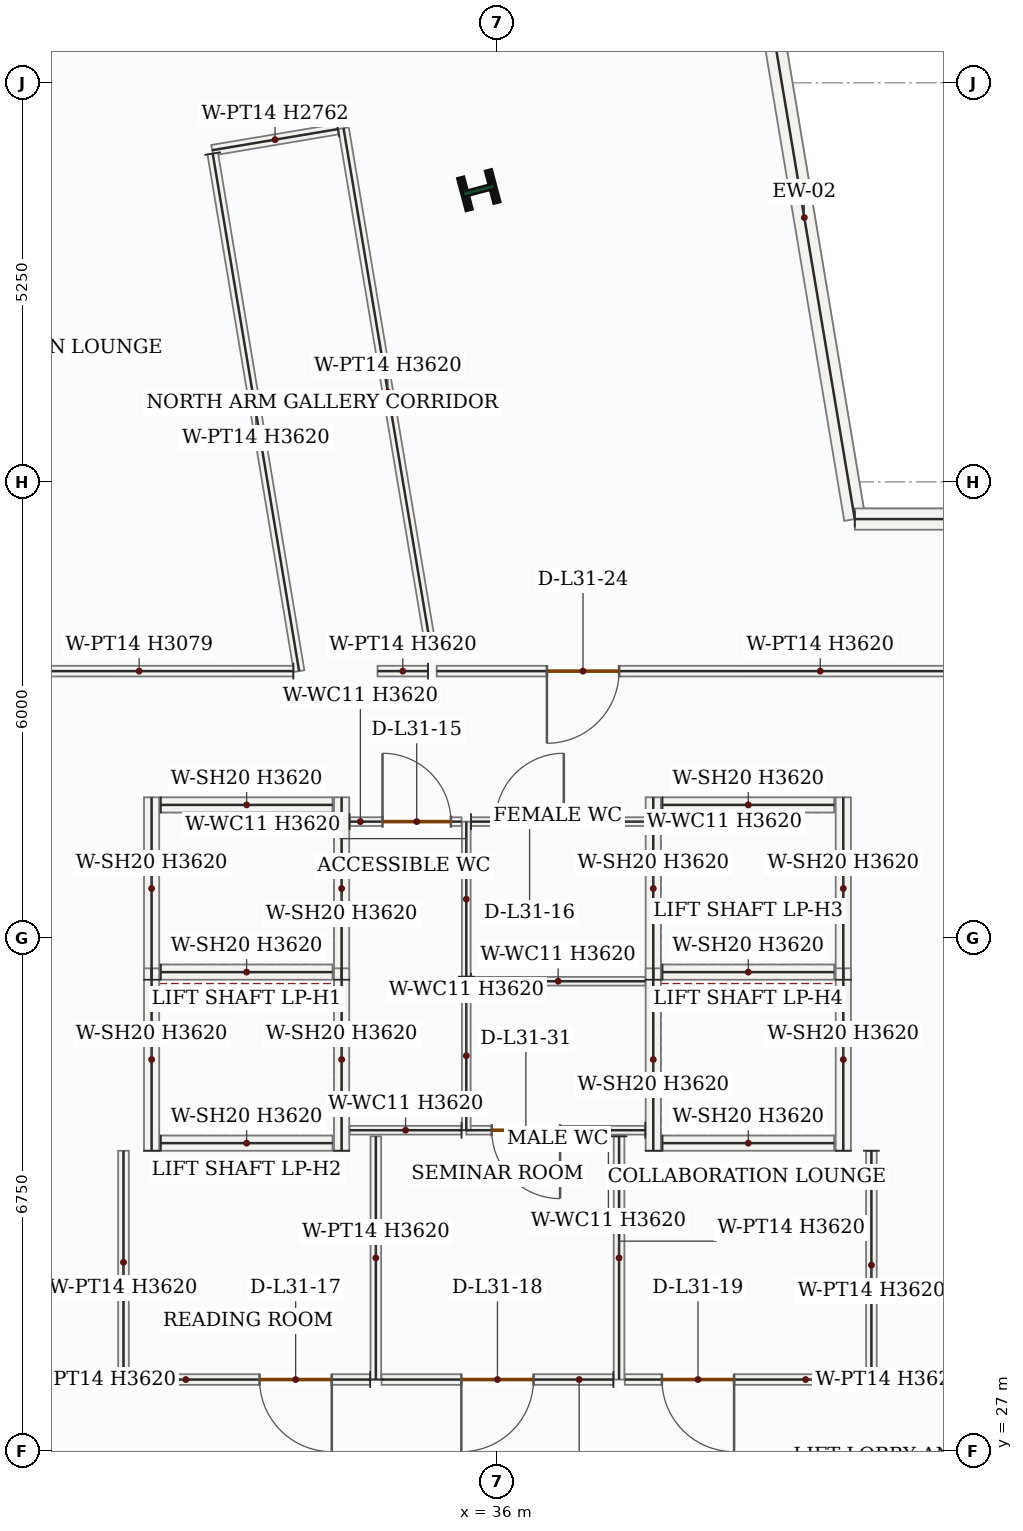
"""IFC4 building model, lengths in metres.
Left out: names, types, materials, properties, quantities, classifications, styles, units other than length and angle.
Written with IfcOpenShell. Run it as: python <this file> out.ifc"""

import sys

from ifc_helpers import new_model, si_unit, direction, frame, frame_2d, origin, origin_2d, place, context, subcontext, project, spatial, rectangle, i_section, extrude, source, transform, mapped, element, fill, save


model = new_model("IFC4")
c1 = context("Model", 3, precision=1e-05, world=origin(), true_north=direction((0.0, 1.0)))
c2 = subcontext(c1, "Body", "Model", "MODEL_VIEW")
j1 = project(units=[si_unit("LENGTHUNIT", "METRE"), si_unit("PLANEANGLEUNIT", "RADIAN")], contexts=[c1])
p1 = place(None, origin())
s1 = spatial("IfcSite", under=j1, at=p1, CompositionType="ELEMENT")
p2 = place(p1, origin())
s2 = spatial("IfcBuilding", under=s1, at=p2, CompositionType="ELEMENT")
p3 = place(p2, frame((0.0, 0.0, 139.5)))
s3 = spatial("IfcBuildingStorey", under=s2, at=p3, CompositionType="ELEMENT", Elevation=139.5)
m1 = source(origin(), c2, "Body", "SweptSolid", [
    extrude(i_section(OverallWidth=0.412, OverallDepth=0.435, WebThickness=0.036, FlangeThickness=0.057, FilletRadius=0.018, at=origin_2d()), origin(), (0.0, 0.0, 1.0), 3.9),
])
p4 = place(p3, frame((35.755, 43.588, 0.0), z_axis=(0.0, 0.0, 1.0), x_axis=(-0.255445757936, 0.966823388604, 0.0)))
e1 = element("IfcColumn", 1, at=p4, inside=s3, PredefinedType="COLUMN", context=c2, shape_type="MappedRepresentation", body=[
    mapped(m1, transform((0.0, 0.0, 0.0), x_axis=(1.0, 0.0, 0.0), y_axis=(0.0, 1.0, 0.0), z_axis=(0.0, 0.0, 1.0), scale=1.0)),
])
m2 = source(origin(), c2, "Body", "SweptSolid", [
    extrude(rectangle(XDim=8.044, YDim=0.28, at=frame_2d((4.022, 0.0))), origin(), (0.0, 0.0, 1.0), 3.62),
])
p5 = place(p3, frame((39.373, 47.194, 0.0), z_axis=(0.0, 0.0, 1.0), x_axis=(0.165048626668, -0.986285430712, 0.0)))
e2 = element("IfcWall", 2, at=p5, inside=s3, PredefinedType="SOLIDWALL", context=c2, shape_type="MappedRepresentation", body=[
    mapped(m2, transform((0.0, 0.0, 0.0), x_axis=(1.0, 0.0, 0.0), y_axis=(0.0, 1.0, 0.0), z_axis=(0.0, 0.0, 1.0), scale=1.0)),
])
m3 = source(origin(), c2, "Body", "SweptSolid", [
    extrude(rectangle(XDim=8.641, YDim=0.28, at=frame_2d((4.321, 0.0))), origin(), (0.0, 0.0, 1.0), 3.62),
])
p6 = place(p3, frame((40.701, 39.26, 0.0), z_axis=(0.0, 0.0, 1.0), x_axis=(1.0, 0.0, 0.0)))
e3 = element("IfcWall", 3, at=p6, inside=s3, PredefinedType="SOLIDWALL", context=c2, shape_type="MappedRepresentation", body=[
    mapped(m3, transform((0.0, 0.0, 0.0), x_axis=(1.0, 0.0, 0.0), y_axis=(0.0, 1.0, 0.0), z_axis=(0.0, 0.0, 1.0), scale=1.0)),
])
m4 = source(origin(), c2, "Body", "SweptSolid", [
    extrude(rectangle(XDim=2.4, YDim=0.2, at=frame_2d((1.2, 0.0))), origin(), (0.0, 0.0, 1.0), 3.62),
])
for number, where, z_axis, x_axis in (
    (4, (31.45, 33.2, 0.0), (0.0, 0.0, 1.0), (0.0, 1.0, 0.0)),
    (5, (33.95, 33.2, 0.0), (0.0, 0.0, 1.0), (0.0, 1.0, 0.0)),
):
    element("IfcWall", number, at=place(p3, frame(where, z_axis=z_axis, x_axis=x_axis)), inside=s3, PredefinedType="SOLIDWALL", context=c2, shape_type="MappedRepresentation", body=[
        mapped(m4, transform((0.0, 0.0, 0.0), x_axis=(1.0, 0.0, 0.0), y_axis=(0.0, 1.0, 0.0), z_axis=(0.0, 0.0, 1.0), scale=1.0)),
    ])
m5 = source(origin(), c2, "Body", "SweptSolid", [
    extrude(rectangle(XDim=2.26, YDim=0.2, at=frame_2d((1.13, 0.0))), origin(), (0.0, 0.0, 1.0), 3.62),
])
for number, where, z_axis, x_axis in (
    (6, (31.57, 33.3, 0.0), (0.0, 0.0, 1.0), (1.0, 0.0, 0.0)),
    (7, (31.57, 35.5, 0.0), (0.0, 0.0, 1.0), (1.0, 0.0, 0.0)),
):
    element("IfcWall", number, at=place(p3, frame(where, z_axis=z_axis, x_axis=x_axis)), inside=s3, PredefinedType="SOLIDWALL", context=c2, shape_type="MappedRepresentation", body=[
        mapped(m5, transform((0.0, 0.0, 0.0), x_axis=(1.0, 0.0, 0.0), y_axis=(0.0, 1.0, 0.0), z_axis=(0.0, 0.0, 1.0), scale=1.0)),
    ])
for number, where, z_axis, x_axis in (
    (8, (31.45, 30.95, 0.0), (0.0, 0.0, 1.0), (0.0, 1.0, 0.0)),
    (9, (33.95, 30.95, 0.0), (0.0, 0.0, 1.0), (0.0, 1.0, 0.0)),
):
    element("IfcWall", number, at=place(p3, frame(where, z_axis=z_axis, x_axis=x_axis)), inside=s3, PredefinedType="SOLIDWALL", context=c2, shape_type="MappedRepresentation", body=[
        mapped(m4, transform((0.0, 0.0, 0.0), x_axis=(1.0, 0.0, 0.0), y_axis=(0.0, 1.0, 0.0), z_axis=(0.0, 0.0, 1.0), scale=1.0)),
    ])
p7 = place(p3, frame((31.57, 31.05, 0.0), z_axis=(0.0, 0.0, 1.0), x_axis=(1.0, 0.0, 0.0)))
e10 = element("IfcWall", 10, at=p7, inside=s3, PredefinedType="SOLIDWALL", context=c2, shape_type="MappedRepresentation", body=[
    mapped(m5, transform((0.0, 0.0, 0.0), x_axis=(1.0, 0.0, 0.0), y_axis=(0.0, 1.0, 0.0), z_axis=(0.0, 0.0, 1.0), scale=1.0)),
])
for number, where, z_axis, x_axis in (
    (11, (38.05, 33.2, 0.0), (0.0, 0.0, 1.0), (0.0, 1.0, 0.0)),
    (12, (40.55, 33.2, 0.0), (0.0, 0.0, 1.0), (0.0, 1.0, 0.0)),
):
    element("IfcWall", number, at=place(p3, frame(where, z_axis=z_axis, x_axis=x_axis)), inside=s3, PredefinedType="SOLIDWALL", context=c2, shape_type="MappedRepresentation", body=[
        mapped(m4, transform((0.0, 0.0, 0.0), x_axis=(1.0, 0.0, 0.0), y_axis=(0.0, 1.0, 0.0), z_axis=(0.0, 0.0, 1.0), scale=1.0)),
    ])
for number, where, z_axis, x_axis in (
    (13, (38.17, 33.3, 0.0), (0.0, 0.0, 1.0), (1.0, 0.0, 0.0)),
    (14, (38.17, 35.5, 0.0), (0.0, 0.0, 1.0), (1.0, 0.0, 0.0)),
):
    element("IfcWall", number, at=place(p3, frame(where, z_axis=z_axis, x_axis=x_axis)), inside=s3, PredefinedType="SOLIDWALL", context=c2, shape_type="MappedRepresentation", body=[
        mapped(m5, transform((0.0, 0.0, 0.0), x_axis=(1.0, 0.0, 0.0), y_axis=(0.0, 1.0, 0.0), z_axis=(0.0, 0.0, 1.0), scale=1.0)),
    ])
for number, where, z_axis, x_axis in (
    (15, (38.05, 30.95, 0.0), (0.0, 0.0, 1.0), (0.0, 1.0, 0.0)),
    (16, (40.55, 30.95, 0.0), (0.0, 0.0, 1.0), (0.0, 1.0, 0.0)),
):
    element("IfcWall", number, at=place(p3, frame(where, z_axis=z_axis, x_axis=x_axis)), inside=s3, PredefinedType="SOLIDWALL", context=c2, shape_type="MappedRepresentation", body=[
        mapped(m4, transform((0.0, 0.0, 0.0), x_axis=(1.0, 0.0, 0.0), y_axis=(0.0, 1.0, 0.0), z_axis=(0.0, 0.0, 1.0), scale=1.0)),
    ])
p8 = place(p3, frame((38.17, 31.05, 0.0), z_axis=(0.0, 0.0, 1.0), x_axis=(1.0, 0.0, 0.0)))
e17 = element("IfcWall", 17, at=p8, inside=s3, PredefinedType="SOLIDWALL", context=c2, shape_type="MappedRepresentation", body=[
    mapped(m5, transform((0.0, 0.0, 0.0), x_axis=(1.0, 0.0, 0.0), y_axis=(0.0, 1.0, 0.0), z_axis=(0.0, 0.0, 1.0), scale=1.0)),
])
p9 = place(p3, frame((37.945, 31.22, 0.0), z_axis=(0.0, 0.0, 1.0), x_axis=(-1.0, 0.0, 0.0)))
e18 = element("IfcWall", 18, at=p9, inside=s3, PredefinedType="PARTITIONING", context=c2, shape_type="SweptSolid", body=[
    extrude(rectangle(XDim=2.355, YDim=0.115, at=frame_2d((1.177, 0.0))), origin(), (0.0, 0.0, 1.0), 3.62),
])
p10 = place(p9, frame((1.121, 0.0, 0.0)))
e19 = element("IfcOpeningElement", 19, at=p10, cuts=e18, PredefinedType="OPENING", context=c2, shape_type="SweptSolid", body=[
    extrude(rectangle(XDim=0.9, YDim=2.1, at=frame_2d((0.45, 1.05))), frame((0.0, 0.067, 0.0), z_axis=(0.0, -1.0, 0.0), x_axis=(1.0, 0.0, 0.0)), (0.0, 0.0, 1.0), 0.135),
])
m6 = source(origin(), c2, "Body", "SweptSolid", [
    extrude(rectangle(XDim=1.96, YDim=0.115, at=frame_2d((0.98, 0.0))), origin(), (0.0, 0.0, 1.0), 3.62),
])
p11 = place(p3, frame((35.59, 31.22, 0.0), z_axis=(0.0, 0.0, 1.0), x_axis=(0.0, 1.0, 0.0)))
e20 = element("IfcWall", 20, at=p11, inside=s3, PredefinedType="PARTITIONING", context=c2, shape_type="MappedRepresentation", body=[
    mapped(m6, transform((0.0, 0.0, 0.0), x_axis=(1.0, 0.0, 0.0), y_axis=(0.0, 1.0, 0.0), z_axis=(0.0, 0.0, 1.0), scale=1.0)),
])
m7 = source(origin(), c2, "Body", "SweptSolid", [
    extrude(rectangle(XDim=2.292, YDim=0.115, at=frame_2d((1.146, 0.0))), origin(), (0.0, 0.0, 1.0), 3.62),
])
p12 = place(p3, frame((35.653, 33.18, 0.0), z_axis=(0.0, 0.0, 1.0), x_axis=(1.0, 0.0, 0.0)))
e21 = element("IfcWall", 21, at=p12, inside=s3, PredefinedType="PARTITIONING", context=c2, shape_type="MappedRepresentation", body=[
    mapped(m7, transform((0.0, 0.0, 0.0), x_axis=(1.0, 0.0, 0.0), y_axis=(0.0, 1.0, 0.0), z_axis=(0.0, 0.0, 1.0), scale=1.0)),
])
m8 = source(origin(), c2, "Body", "SweptSolid", [
    extrude(rectangle(XDim=2.04, YDim=0.115, at=frame_2d((1.02, 0.0))), origin(), (0.0, 0.0, 1.0), 3.62),
])
p13 = place(p3, frame((35.59, 33.24, 0.0), z_axis=(0.0, 0.0, 1.0), x_axis=(0.0, 1.0, 0.0)))
e22 = element("IfcWall", 22, at=p13, inside=s3, PredefinedType="PARTITIONING", context=c2, shape_type="MappedRepresentation", body=[
    mapped(m8, transform((0.0, 0.0, 0.0), x_axis=(1.0, 0.0, 0.0), y_axis=(0.0, 1.0, 0.0), z_axis=(0.0, 0.0, 1.0), scale=1.0)),
])
p14 = place(p3, frame((35.653, 35.28, 0.0), z_axis=(0.0, 0.0, 1.0), x_axis=(1.0, 0.0, 0.0)))
e23 = element("IfcWall", 23, at=p14, inside=s3, PredefinedType="PARTITIONING", context=c2, shape_type="SweptSolid", body=[
    extrude(rectangle(XDim=2.292, YDim=0.115, at=frame_2d((1.146, 0.0))), origin(), (0.0, 0.0, 1.0), 3.62),
])
p15 = place(p14, frame((0.32, 0.0, 0.0)))
e24 = element("IfcOpeningElement", 24, at=p15, cuts=e23, PredefinedType="OPENING", context=c2, shape_type="SweptSolid", body=[
    extrude(rectangle(XDim=0.9, YDim=2.1, at=frame_2d((0.45, 1.05))), frame((0.0, 0.067, 0.0), z_axis=(0.0, -1.0, 0.0), x_axis=(1.0, 0.0, 0.0)), (0.0, 0.0, 1.0), 0.135),
])
m9 = source(origin(), c2, "Body", "SweptSolid", [
    extrude(rectangle(XDim=1.473, YDim=0.115, at=frame_2d((0.736, 0.0))), origin(), (0.0, 0.0, 1.0), 3.62),
])
p16 = place(p3, frame((35.528, 31.22, 0.0), z_axis=(0.0, 0.0, 1.0), x_axis=(-1.0, 0.0, 0.0)))
e25 = element("IfcWall", 25, at=p16, inside=s3, PredefinedType="PARTITIONING", context=c2, shape_type="MappedRepresentation", body=[
    mapped(m9, transform((0.0, 0.0, 0.0), x_axis=(1.0, 0.0, 0.0), y_axis=(0.0, 1.0, 0.0), z_axis=(0.0, 0.0, 1.0), scale=1.0)),
])
p17 = place(p3, frame((34.055, 35.28, 0.0), z_axis=(0.0, 0.0, 1.0), x_axis=(1.0, 0.0, 0.0)))
e26 = element("IfcWall", 26, at=p17, inside=s3, PredefinedType="PARTITIONING", context=c2, shape_type="SweptSolid", body=[
    extrude(rectangle(XDim=1.473, YDim=0.115, at=frame_2d((0.736, 0.0))), origin(), (0.0, 0.0, 1.0), 3.62),
])
p18 = place(p17, frame((0.433, 0.0, 0.0)))
e27 = element("IfcOpeningElement", 27, at=p18, cuts=e26, PredefinedType="OPENING", context=c2, shape_type="SweptSolid", body=[
    extrude(rectangle(XDim=0.9, YDim=2.1, at=frame_2d((0.45, 1.05))), frame((0.0, 0.067, 0.0), z_axis=(0.0, -1.0, 0.0), x_axis=(1.0, 0.0, 0.0)), (0.0, 0.0, 1.0), 0.135),
])
m10 = source(origin(), c2, "Body", "SweptSolid", [
    extrude(rectangle(XDim=3.2, YDim=0.14, at=frame_2d((1.6, 0.0))), origin(), (0.0, 0.0, 1.0), 3.62),
])
for number, where, z_axis, x_axis in (
    (28, (34.4, 27.94, 0.0), (0.0, 0.0, 1.0), (0.0, 1.0, 0.0)),
    (29, (37.6, 31.14, 0.0), (0.0, 0.0, 1.0), (0.0, -1.0, 0.0)),
):
    element("IfcWall", number, at=place(p3, frame(where, z_axis=z_axis, x_axis=x_axis)), inside=s3, PredefinedType="PARTITIONING", context=c2, shape_type="MappedRepresentation", body=[
        mapped(m10, transform((0.0, 0.0, 0.0), x_axis=(1.0, 0.0, 0.0), y_axis=(0.0, 1.0, 0.0), z_axis=(0.0, 0.0, 1.0), scale=1.0)),
    ])
p19 = place(p3, frame((37.525, 27.94, 0.0), z_axis=(0.0, 0.0, 1.0), x_axis=(-1.0, 0.0, 0.0)))
e30 = element("IfcWall", 30, at=p19, inside=s3, PredefinedType="PARTITIONING", context=c2, shape_type="SweptSolid", body=[
    extrude(rectangle(XDim=3.05, YDim=0.14, at=frame_2d((1.525, 0.0))), origin(), (0.0, 0.0, 1.0), 3.62),
])
p20 = place(p19, frame((1.05, 0.0, 0.0)))
e31 = element("IfcOpeningElement", 31, at=p20, cuts=e30, PredefinedType="OPENING", context=c2, shape_type="SweptSolid", body=[
    extrude(rectangle(XDim=0.95, YDim=2.15, at=frame_2d((0.475, 1.075))), frame((0.0, 0.08, 0.0), z_axis=(0.0, -1.0, 0.0), x_axis=(1.0, 0.0, 0.0)), (0.0, 0.0, 1.0), 0.16),
])
p21 = place(p3, frame((34.325, 27.94, 0.0), z_axis=(0.0, 0.0, 1.0), x_axis=(-1.0, 0.0, 0.0)))
e32 = element("IfcWall", 32, at=p21, inside=s3, PredefinedType="PARTITIONING", context=c2, shape_type="SweptSolid", body=[
    extrude(rectangle(XDim=3.245, YDim=0.14, at=frame_2d((1.623, 0.0))), origin(), (0.0, 0.0, 1.0), 3.62),
])
p22 = place(p21, frame((0.505, 0.0, 0.0)))
e33 = element("IfcOpeningElement", 33, at=p22, cuts=e32, PredefinedType="OPENING", context=c2, shape_type="SweptSolid", body=[
    extrude(rectangle(XDim=0.95, YDim=2.15, at=frame_2d((0.475, 1.075))), frame((0.0, 0.08, 0.0), z_axis=(0.0, -1.0, 0.0), x_axis=(1.0, 0.0, 0.0)), (0.0, 0.0, 1.0), 0.16),
])
m11 = source(origin(), c2, "Body", "SweptSolid", [
    extrude(rectangle(XDim=2.935, YDim=0.14, at=frame_2d((1.468, 0.0))), origin(), (0.0, 0.0, 1.0), 3.62),
])
p23 = place(p3, frame((31.08, 28.015, 0.0), z_axis=(0.0, 0.0, 1.0), x_axis=(0.0, 1.0, 0.0)))
e34 = element("IfcWall", 34, at=p23, inside=s3, PredefinedType="PARTITIONING", context=c2, shape_type="MappedRepresentation", body=[
    mapped(m11, transform((0.0, 0.0, 0.0), x_axis=(1.0, 0.0, 0.0), y_axis=(0.0, 1.0, 0.0), z_axis=(0.0, 0.0, 1.0), scale=1.0)),
])
m12 = source(origin(), c2, "Body", "SweptSolid", [
    extrude(rectangle(XDim=3.01, YDim=0.14, at=frame_2d((1.505, 0.0))), origin(), (0.0, 0.0, 1.0), 3.62),
])
p24 = place(p3, frame((40.92, 30.95, 0.0), z_axis=(0.0, 0.0, 1.0), x_axis=(0.0, -1.0, 0.0)))
e35 = element("IfcWall", 35, at=p24, inside=s3, PredefinedType="PARTITIONING", context=c2, shape_type="MappedRepresentation", body=[
    mapped(m12, transform((0.0, 0.0, 0.0), x_axis=(1.0, 0.0, 0.0), y_axis=(0.0, 1.0, 0.0), z_axis=(0.0, 0.0, 1.0), scale=1.0)),
])
p25 = place(p3, frame((40.845, 27.94, 0.0), z_axis=(0.0, 0.0, 1.0), x_axis=(-1.0, 0.0, 0.0)))
e36 = element("IfcWall", 36, at=p25, inside=s3, PredefinedType="PARTITIONING", context=c2, shape_type="SweptSolid", body=[
    extrude(rectangle(XDim=3.17, YDim=0.14, at=frame_2d((1.585, 0.0))), origin(), (0.0, 0.0, 1.0), 3.62),
])
p26 = place(p25, frame((1.732, 0.0, 0.0)))
e37 = element("IfcOpeningElement", 37, at=p26, cuts=e36, PredefinedType="OPENING", context=c2, shape_type="SweptSolid", body=[
    extrude(rectangle(XDim=0.95, YDim=2.15, at=frame_2d((0.475, 1.075))), frame((0.0, 0.08, 0.0), z_axis=(0.0, -1.0, 0.0), x_axis=(1.0, 0.0, 0.0)), (0.0, 0.0, 1.0), 0.16),
])
p27 = place(p3, frame((42.742, 37.26, 0.0), z_axis=(0.0, 0.0, 1.0), x_axis=(-0.999999999476, 3.2371888e-05, 0.0)))
e38 = element("IfcWall", 38, at=p27, inside=s3, PredefinedType="PARTITIONING", context=c2, shape_type="SweptSolid", body=[
    extrude(rectangle(XDim=7.542, YDim=0.14, at=frame_2d((3.771, 0.0))), origin(), (0.0, 0.0, 1.0), 3.62),
])
p28 = place(p27, frame((5.142, 0.0, 0.0)))
e39 = element("IfcOpeningElement", 39, at=p28, cuts=e38, PredefinedType="OPENING", context=c2, shape_type="SweptSolid", body=[
    extrude(rectangle(XDim=0.95, YDim=2.15, at=frame_2d((0.475, 1.075))), frame((0.0, 0.08, 0.0), z_axis=(0.0, -1.0, 0.0), x_axis=(1.0, 0.0, 0.0)), (0.0, 0.0, 1.0), 0.16),
])
m13 = source(origin(), c2, "Body", "SweptSolid", [
    extrude(rectangle(XDim=0.664, YDim=0.14, at=frame_2d((0.332, 0.0))), origin(), (0.0, 0.0, 1.0), 3.62),
])
p29 = place(p3, frame((35.086, 37.26, 0.0), z_axis=(0.0, 0.0, 1.0), x_axis=(-1.0, 0.0, 0.0)))
e40 = element("IfcWall", 40, at=p29, inside=s3, PredefinedType="PARTITIONING", context=c2, shape_type="MappedRepresentation", body=[
    mapped(m13, transform((0.0, 0.0, 0.0), x_axis=(1.0, 0.0, 0.0), y_axis=(0.0, 1.0, 0.0), z_axis=(0.0, 0.0, 1.0), scale=1.0)),
])
m14 = source(origin(), c2, "Body", "SweptSolid", [
    extrude(rectangle(XDim=7.041, YDim=0.14, at=frame_2d((3.521, 0.0))), origin(), (0.0, 0.0, 1.0), 3.62),
])
p30 = place(p3, frame((35.142, 37.459, 0.0), z_axis=(0.0, 0.0, 1.0), x_axis=(-0.165703306215, 0.98617565084, 0.0)))
e41 = element("IfcWall", 41, at=p30, inside=s3, PredefinedType="PARTITIONING", context=c2, shape_type="MappedRepresentation", body=[
    mapped(m14, transform((0.0, 0.0, 0.0), x_axis=(1.0, 0.0, 0.0), y_axis=(0.0, 1.0, 0.0), z_axis=(0.0, 0.0, 1.0), scale=1.0)),
])
m15 = source(origin(), c2, "Body", "SweptSolid", [
    extrude(rectangle(XDim=1.677, YDim=0.14, at=frame_2d((0.839, 0.0))), origin(), (0.0, 0.0, 1.0), 2.762),
])
p31 = place(p3, frame((33.901, 44.391, 0.0), z_axis=(0.0, 0.0, 1.0), x_axis=(-0.986164833546, -0.165767671991, 0.0)))
e42 = element("IfcWall", 42, at=p31, inside=s3, PredefinedType="PARTITIONING", context=c2, shape_type="MappedRepresentation", body=[
    mapped(m15, transform((0.0, 0.0, 0.0), x_axis=(1.0, 0.0, 0.0), y_axis=(0.0, 1.0, 0.0), z_axis=(0.0, 0.0, 1.0), scale=1.0)),
])
m16 = source(origin(), c2, "Body", "SweptSolid", [
    extrude(rectangle(XDim=6.903, YDim=0.14, at=frame_2d((3.451, 0.0))), origin(), (0.0, 0.0, 1.0), 3.62),
])
p32 = place(p3, frame((32.254, 44.069, 0.0), z_axis=(0.0, 0.0, 1.0), x_axis=(0.164708688009, -0.986342257076, 0.0)))
e43 = element("IfcWall", 43, at=p32, inside=s3, PredefinedType="PARTITIONING", context=c2, shape_type="MappedRepresentation", body=[
    mapped(m16, transform((0.0, 0.0, 0.0), x_axis=(1.0, 0.0, 0.0), y_axis=(0.0, 1.0, 0.0), z_axis=(0.0, 0.0, 1.0), scale=1.0)),
])
m17 = source(origin(), c2, "Body", "SweptSolid", [
    extrude(rectangle(XDim=4.057, YDim=0.14, at=frame_2d((2.029, 0.0))), origin(), (0.0, 0.0, 1.0), 3.079),
])
p33 = place(p3, frame((33.315, 37.26, 0.0), z_axis=(0.0, 0.0, 1.0), x_axis=(-0.999999998189, -6.0175713e-05, 0.0)))
e44 = element("IfcWall", 44, at=p33, inside=s3, PredefinedType="PARTITIONING", context=c2, shape_type="MappedRepresentation", body=[
    mapped(m17, transform((0.0, 0.0, 0.0), x_axis=(1.0, 0.0, 0.0), y_axis=(0.0, 1.0, 0.0), z_axis=(0.0, 0.0, 1.0), scale=1.0)),
])
m18 = source(origin(), c2, "Body", "SweptSolid", [
    extrude(rectangle(XDim=0.9, YDim=2.1, at=frame_2d((0.45, 1.05))), frame((0.0, 0.025, 0.0), z_axis=(0.0, -1.0, 0.0), x_axis=(1.0, 0.0, 0.0)), (0.0, 0.0, 1.0), 0.05),
])
p34 = place(p18, origin())
e45 = element("IfcDoor", 45, at=p34, inside=s3, OperationType="SINGLE_SWING_LEFT", PredefinedType="DOOR", context=c2, shape_type="MappedRepresentation", body=[
    mapped(m18, transform((0.0, 0.0, 0.0), x_axis=(1.0, 0.0, 0.0), y_axis=(0.0, 1.0, 0.0), z_axis=(0.0, 0.0, 1.0), scale=1.0)),
])
fill(e27, e45)
p35 = place(p15, origin())
e46 = element("IfcDoor", 46, at=p35, inside=s3, OperationType="SINGLE_SWING_RIGHT", PredefinedType="DOOR", context=c2, shape_type="MappedRepresentation", body=[
    mapped(m18, transform((0.0, 0.0, 0.0), x_axis=(1.0, 0.0, 0.0), y_axis=(0.0, 1.0, 0.0), z_axis=(0.0, 0.0, 1.0), scale=1.0)),
])
fill(e24, e46)
m19 = source(origin(), c2, "Body", "SweptSolid", [
    extrude(rectangle(XDim=0.95, YDim=2.15, at=frame_2d((0.475, 1.075))), frame((0.0, 0.025, 0.0), z_axis=(0.0, -1.0, 0.0), x_axis=(1.0, 0.0, 0.0)), (0.0, 0.0, 1.0), 0.05),
])
p36 = place(p22, origin())
e47 = element("IfcDoor", 47, at=p36, inside=s3, OperationType="SINGLE_SWING_LEFT", PredefinedType="DOOR", context=c2, shape_type="MappedRepresentation", body=[
    mapped(m19, transform((0.0, 0.0, 0.0), x_axis=(1.0, 0.0, 0.0), y_axis=(0.0, 1.0, 0.0), z_axis=(0.0, 0.0, 1.0), scale=1.0)),
])
fill(e33, e47)
p37 = place(p20, origin())
e48 = element("IfcDoor", 48, at=p37, inside=s3, OperationType="SINGLE_SWING_RIGHT", PredefinedType="DOOR", context=c2, shape_type="MappedRepresentation", body=[
    mapped(m19, transform((0.0, 0.0, 0.0), x_axis=(1.0, 0.0, 0.0), y_axis=(0.0, 1.0, 0.0), z_axis=(0.0, 0.0, 1.0), scale=1.0)),
])
fill(e31, e48)
p38 = place(p26, origin())
e49 = element("IfcDoor", 49, at=p38, inside=s3, OperationType="SINGLE_SWING_LEFT", PredefinedType="DOOR", context=c2, shape_type="MappedRepresentation", body=[
    mapped(m19, transform((0.0, 0.0, 0.0), x_axis=(1.0, 0.0, 0.0), y_axis=(0.0, 1.0, 0.0), z_axis=(0.0, 0.0, 1.0), scale=1.0)),
])
fill(e37, e49)
p39 = place(p28, origin())
e50 = element("IfcDoor", 50, at=p39, inside=s3, OperationType="SINGLE_SWING_RIGHT", PredefinedType="DOOR", context=c2, shape_type="MappedRepresentation", body=[
    mapped(m19, transform((0.0, 0.0, 0.0), x_axis=(1.0, 0.0, 0.0), y_axis=(0.0, 1.0, 0.0), z_axis=(0.0, 0.0, 1.0), scale=1.0)),
])
fill(e39, e50)
p40 = place(p10, origin())
e51 = element("IfcDoor", 51, at=p40, inside=s3, OperationType="SINGLE_SWING_LEFT", PredefinedType="DOOR", context=c2, shape_type="MappedRepresentation", body=[
    mapped(m18, transform((0.0, 0.0, 0.0), x_axis=(1.0, 0.0, 0.0), y_axis=(0.0, 1.0, 0.0), z_axis=(0.0, 0.0, 1.0), scale=1.0)),
])
fill(e19, e51)
save(model, sys.argv[1])
